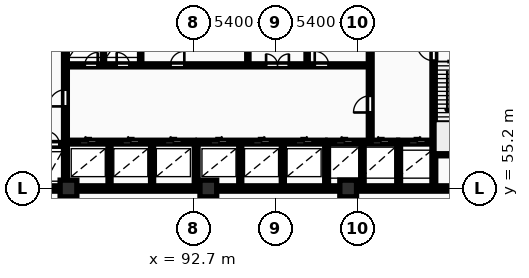
"""IFC4 building model, lengths in metres.
Left out: names, types, materials, properties, quantities, classifications, styles, units other than length and angle.
Written with IfcOpenShell. Run it as: python <this file> out.ifc"""

import sys

from ifc_helpers import new_model, si_unit, direction, frame, frame_2d, origin, origin_2d, place, context, subcontext, project, spatial, rectangle, extrude, element, fill, save


model = new_model("IFC4")
c1 = context("Model", 3, precision=1e-05, world=origin(), true_north=direction((0.0, 1.0)))
c2 = subcontext(c1, "Body", "Model", "MODEL_VIEW")
j1 = project(units=[si_unit("LENGTHUNIT", "METRE"), si_unit("PLANEANGLEUNIT", "RADIAN")], contexts=[c1])
p1 = place(None, origin())
s1 = spatial("IfcSite", under=j1, at=p1, CompositionType="ELEMENT")
p2 = place(p1, origin())
s2 = spatial("IfcBuilding", under=s1, at=p2, CompositionType="ELEMENT")
p3 = place(p2, origin())
s3 = spatial("IfcBuildingStorey", under=s2, at=p3, CompositionType="ELEMENT", Elevation=0.0)
for number, where, z_axis, x_axis in (
    (1, (84.5, 55.2, 0.0), (0.0, 0.0, 1.0), (1.0, 0.0, 0.0)),
    (2, (93.7, 55.2, 0.0), (0.0, 0.0, 1.0), (1.0, 0.0, 0.0)),
    (3, (102.9, 55.2, 0.0), (0.0, 0.0, 1.0), (1.0, 0.0, 0.0)),
):
    element("IfcColumn", number, at=place(p3, frame(where, z_axis=z_axis, x_axis=x_axis)), inside=s3, PredefinedType="COLUMN", context=c2, shape_type="SweptSolid", body=[
        extrude(rectangle(XDim=1.1, YDim=1.1, at=origin_2d()), origin(), (0.0, 0.0, 1.0), 5.4),
    ])
p4 = place(p3, frame((75.95, 55.2, 0.0), z_axis=(0.0, 0.0, 1.0), x_axis=(1.0, 0.0, 0.0)))
e4 = element("IfcWall", 4, at=p4, inside=s3, PredefinedType="SHEAR", context=c2, shape_type="SweptSolid", body=[
    extrude(rectangle(XDim=36.3, YDim=0.35, at=frame_2d((18.15, 0.0))), origin(), (0.0, 0.0, 1.0), 5.4),
])
p5 = place(p3, frame((79.79, 58.1, 0.0), z_axis=(0.0, 0.0, 1.0), x_axis=(1.0, 0.0, 0.0)))
e5 = element("IfcWall", 5, at=p5, inside=s3, PredefinedType="SHEAR", context=c2, shape_type="SweptSolid", body=[
    extrude(rectangle(XDim=4.39, YDim=0.25, at=frame_2d((2.195, 0.0))), origin(), (0.0, 0.0, 1.0), 5.4),
])
p6 = place(p5, frame((1.05, 0.0, 0.0)))
e6 = element("IfcOpeningElement", 6, at=p6, cuts=e5, PredefinedType="OPENING", context=c2, shape_type="SweptSolid", body=[
    extrude(rectangle(XDim=1.12, YDim=2.12, at=frame_2d((0.56, 1.06))), frame((0.0, 0.135, 0.0), z_axis=(0.0, -1.0, 0.0), x_axis=(1.0, 0.0, 0.0)), (0.0, 0.0, 1.0), 0.27),
])
p7 = place(p5, frame((3.26, 0.0, 0.0)))
e7 = element("IfcOpeningElement", 7, at=p7, cuts=e5, PredefinedType="OPENING", context=c2, shape_type="SweptSolid", body=[
    extrude(rectangle(XDim=0.85, YDim=2.05, at=frame_2d((0.425, 1.025))), frame((0.0, 0.135, 0.0), z_axis=(0.0, -1.0, 0.0), x_axis=(1.0, 0.0, 0.0)), (0.0, 0.0, 1.0), 0.27),
])
p8 = place(p3, frame((84.3, 55.4, 0.0), z_axis=(0.0, 0.0, 1.0), x_axis=(0.0, 1.0, 0.0)))
e8 = element("IfcWall", 8, at=p8, inside=s3, PredefinedType="SHEAR", context=c2, shape_type="SweptSolid", body=[
    extrude(rectangle(XDim=11.6, YDim=0.25, at=frame_2d((5.8, 0.0))), origin(), (0.0, 0.0, 1.0), 5.4),
])
p9 = place(p8, frame((5.2, 0.0, 0.0)))
e9 = element("IfcOpeningElement", 9, at=p9, cuts=e8, PredefinedType="OPENING", context=c2, shape_type="SweptSolid", body=[
    extrude(rectangle(XDim=1.1, YDim=2.1, at=frame_2d((0.55, 1.05))), frame((0.0, 0.135, 0.0), z_axis=(0.0, -1.0, 0.0), x_axis=(1.0, 0.0, 0.0)), (0.0, 0.0, 1.0), 0.27),
])
for number, where, z_axis, x_axis in (
    (10, (87.2, 55.4, 0.0), (0.0, 0.0, 1.0), (0.0, 1.0, 0.0)),
    (11, (90.0, 55.4, 0.0), (0.0, 0.0, 1.0), (0.0, 1.0, 0.0)),
):
    element("IfcWall", number, at=place(p3, frame(where, z_axis=z_axis, x_axis=x_axis)), inside=s3, PredefinedType="PARTITIONING", context=c2, shape_type="SweptSolid", body=[
        extrude(rectangle(XDim=2.72, YDim=0.2, at=frame_2d((1.36, 0.0))), origin(), (0.0, 0.0, 1.0), 5.1),
    ])
p10 = place(p3, frame((84.42, 58.25, 0.0), z_axis=(0.0, 0.0, 1.0), x_axis=(1.0, 0.0, 0.0)))
e12 = element("IfcWall", 12, at=p10, inside=s3, PredefinedType="SHEAR", context=c2, shape_type="SweptSolid", body=[
    extrude(rectangle(XDim=8.36, YDim=0.25, at=frame_2d((4.18, 0.0))), origin(), (0.0, 0.0, 1.0), 5.4),
])
p11 = place(p10, frame((0.82, 0.0, 0.0)))
e13 = element("IfcOpeningElement", 13, at=p11, cuts=e12, PredefinedType="OPENING", context=c2, shape_type="SweptSolid", body=[
    extrude(rectangle(XDim=1.12, YDim=2.12, at=frame_2d((0.56, 1.06))), frame((0.0, 0.135, 0.0), z_axis=(0.0, -1.0, 0.0), x_axis=(1.0, 0.0, 0.0)), (0.0, 0.0, 1.0), 0.27),
])
p12 = place(p10, frame((3.62, 0.0, 0.0)))
e14 = element("IfcOpeningElement", 14, at=p12, cuts=e12, PredefinedType="OPENING", context=c2, shape_type="SweptSolid", body=[
    extrude(rectangle(XDim=1.12, YDim=2.12, at=frame_2d((0.56, 1.06))), frame((0.0, 0.135, 0.0), z_axis=(0.0, -1.0, 0.0), x_axis=(1.0, 0.0, 0.0)), (0.0, 0.0, 1.0), 0.27),
])
p13 = place(p10, frame((6.42, 0.0, 0.0)))
e15 = element("IfcOpeningElement", 15, at=p13, cuts=e12, PredefinedType="OPENING", context=c2, shape_type="SweptSolid", body=[
    extrude(rectangle(XDim=1.12, YDim=2.12, at=frame_2d((0.56, 1.06))), frame((0.0, 0.135, 0.0), z_axis=(0.0, -1.0, 0.0), x_axis=(1.0, 0.0, 0.0)), (0.0, 0.0, 1.0), 0.27),
])
p14 = place(p3, frame((92.9, 55.4, 0.0), z_axis=(0.0, 0.0, 1.0), x_axis=(0.0, 1.0, 0.0)))
e16 = element("IfcWall", 16, at=p14, inside=s3, PredefinedType="SHEAR", context=c2, shape_type="SweptSolid", body=[
    extrude(rectangle(XDim=2.85, YDim=0.25, at=frame_2d((1.425, 0.0))), origin(), (0.0, 0.0, 1.0), 5.4),
])
for number, where, z_axis, x_axis in (
    (17, (95.8, 55.4, 0.0), (0.0, 0.0, 1.0), (0.0, 1.0, 0.0)),
    (18, (98.6, 55.4, 0.0), (0.0, 0.0, 1.0), (0.0, 1.0, 0.0)),
):
    element("IfcWall", number, at=place(p3, frame(where, z_axis=z_axis, x_axis=x_axis)), inside=s3, PredefinedType="PARTITIONING", context=c2, shape_type="SweptSolid", body=[
        extrude(rectangle(XDim=2.72, YDim=0.2, at=frame_2d((1.36, 0.0))), origin(), (0.0, 0.0, 1.0), 5.1),
    ])
p15 = place(p3, frame((93.02, 58.25, 0.0), z_axis=(0.0, 0.0, 1.0), x_axis=(1.0, 0.0, 0.0)))
e19 = element("IfcWall", 19, at=p15, inside=s3, PredefinedType="SHEAR", context=c2, shape_type="SweptSolid", body=[
    extrude(rectangle(XDim=8.36, YDim=0.25, at=frame_2d((4.18, 0.0))), origin(), (0.0, 0.0, 1.0), 5.4),
])
p16 = place(p15, frame((0.82, 0.0, 0.0)))
e20 = element("IfcOpeningElement", 20, at=p16, cuts=e19, PredefinedType="OPENING", context=c2, shape_type="SweptSolid", body=[
    extrude(rectangle(XDim=1.12, YDim=2.12, at=frame_2d((0.56, 1.06))), frame((0.0, 0.135, 0.0), z_axis=(0.0, -1.0, 0.0), x_axis=(1.0, 0.0, 0.0)), (0.0, 0.0, 1.0), 0.27),
])
p17 = place(p15, frame((3.62, 0.0, 0.0)))
e21 = element("IfcOpeningElement", 21, at=p17, cuts=e19, PredefinedType="OPENING", context=c2, shape_type="SweptSolid", body=[
    extrude(rectangle(XDim=1.12, YDim=2.12, at=frame_2d((0.56, 1.06))), frame((0.0, 0.135, 0.0), z_axis=(0.0, -1.0, 0.0), x_axis=(1.0, 0.0, 0.0)), (0.0, 0.0, 1.0), 0.27),
])
p18 = place(p15, frame((6.42, 0.0, 0.0)))
e22 = element("IfcOpeningElement", 22, at=p18, cuts=e19, PredefinedType="OPENING", context=c2, shape_type="SweptSolid", body=[
    extrude(rectangle(XDim=1.12, YDim=2.12, at=frame_2d((0.56, 1.06))), frame((0.0, 0.135, 0.0), z_axis=(0.0, -1.0, 0.0), x_axis=(1.0, 0.0, 0.0)), (0.0, 0.0, 1.0), 0.27),
])
p19 = place(p3, frame((101.48, 55.4, 0.0), z_axis=(0.0, 0.0, 1.0), x_axis=(0.0, 1.0, 0.0)))
e23 = element("IfcWall", 23, at=p19, inside=s3, PredefinedType="SHEAR", context=c2, shape_type="SweptSolid", body=[
    extrude(rectangle(XDim=2.85, YDim=0.25, at=frame_2d((1.425, 0.0))), origin(), (0.0, 0.0, 1.0), 5.4),
])
p20 = place(p3, frame((103.85, 55.4, 0.0), z_axis=(0.0, 0.0, 1.0), x_axis=(0.0, 1.0, 0.0)))
e24 = element("IfcWall", 24, at=p20, inside=s3, PredefinedType="PARTITIONING", context=c2, shape_type="SweptSolid", body=[
    extrude(rectangle(XDim=2.72, YDim=0.2, at=frame_2d((1.36, 0.0))), origin(), (0.0, 0.0, 1.0), 5.1),
])
p21 = place(p3, frame((101.55, 58.25, 0.0), z_axis=(0.0, 0.0, 1.0), x_axis=(1.0, 0.0, 0.0)))
e25 = element("IfcWall", 25, at=p21, inside=s3, PredefinedType="SHEAR", context=c2, shape_type="SweptSolid", body=[
    extrude(rectangle(XDim=4.6, YDim=0.25, at=frame_2d((2.3, 0.0))), origin(), (0.0, 0.0, 1.0), 5.4),
])
p22 = place(p21, frame((0.54, 0.0, 0.0)))
e26 = element("IfcOpeningElement", 26, at=p22, cuts=e25, PredefinedType="OPENING", context=c2, shape_type="SweptSolid", body=[
    extrude(rectangle(XDim=1.12, YDim=2.12, at=frame_2d((0.56, 1.06))), frame((0.0, 0.135, 0.0), z_axis=(0.0, -1.0, 0.0), x_axis=(1.0, 0.0, 0.0)), (0.0, 0.0, 1.0), 0.27),
])
p23 = place(p21, frame((2.94, 0.0, 0.0)))
e27 = element("IfcOpeningElement", 27, at=p23, cuts=e25, PredefinedType="OPENING", context=c2, shape_type="SweptSolid", body=[
    extrude(rectangle(XDim=1.12, YDim=2.12, at=frame_2d((0.56, 1.06))), frame((0.0, 0.135, 0.0), z_axis=(0.0, -1.0, 0.0), x_axis=(1.0, 0.0, 0.0)), (0.0, 0.0, 1.0), 0.27),
])
p24 = place(p3, frame((106.22, 55.4, 0.0), z_axis=(0.0, 0.0, 1.0), x_axis=(0.0, 1.0, 0.0)))
e28 = element("IfcWall", 28, at=p24, inside=s3, PredefinedType="SHEAR", context=c2, shape_type="SweptSolid", body=[
    extrude(rectangle(XDim=2.85, YDim=0.25, at=frame_2d((1.425, 0.0))), origin(), (0.0, 0.0, 1.0), 5.4),
])
p25 = place(p3, frame((106.22, 58.25, 0.0), z_axis=(0.0, 0.0, 1.0), x_axis=(1.0, 0.0, 0.0)))
e29 = element("IfcWall", 29, at=p25, inside=s3, PredefinedType="SHEAR", context=c2, shape_type="SweptSolid", body=[
    extrude(rectangle(XDim=2.46, YDim=0.25, at=frame_2d((1.23, 0.0))), origin(), (0.0, 0.0, 1.0), 5.4),
])
p26 = place(p25, frame((0.67, 0.0, 0.0)))
e30 = element("IfcOpeningElement", 30, at=p26, cuts=e29, PredefinedType="OPENING", context=c2, shape_type="SweptSolid", body=[
    extrude(rectangle(XDim=1.12, YDim=2.12, at=frame_2d((0.56, 1.06))), frame((0.0, 0.135, 0.0), z_axis=(0.0, -1.0, 0.0), x_axis=(1.0, 0.0, 0.0)), (0.0, 0.0, 1.0), 0.27),
])
for number, where, z_axis, x_axis in (
    (31, (86.8, 63.4, 0.0), (0.0, 0.0, 1.0), (0.0, 1.0, 0.0)),
    (32, (89.25, 63.4, 0.0), (0.0, 0.0, 1.0), (0.0, 1.0, 0.0)),
    (33, (96.3, 63.4, 0.0), (0.0, 0.0, 1.0), (0.0, 1.0, 0.0)),
    (34, (100.2, 63.4, 0.0), (0.0, 0.0, 1.0), (0.0, 1.0, 0.0)),
):
    element("IfcWall", number, at=place(p3, frame(where, z_axis=z_axis, x_axis=x_axis)), inside=s3, PredefinedType="PARTITIONING", context=c2, shape_type="SweptSolid", body=[
        extrude(rectangle(XDim=3.6, YDim=0.15, at=frame_2d((1.8, 0.0))), origin(), (0.0, 0.0, 1.0), 5.1),
    ])
p27 = place(p3, frame((84.42, 63.3, 0.0), z_axis=(0.0, 0.0, 1.0), x_axis=(1.0, 0.0, 0.0)))
e35 = element("IfcWall", 35, at=p27, inside=s3, PredefinedType="PARTITIONING", context=c2, shape_type="SweptSolid", body=[
    extrude(rectangle(XDim=19.83, YDim=0.2, at=frame_2d((9.915, 0.0))), origin(), (0.0, 0.0, 1.0), 5.1),
])
p28 = place(p27, frame((1.15, 0.0, 0.0)))
e36 = element("IfcOpeningElement", 36, at=p28, cuts=e35, PredefinedType="OPENING", context=c2, shape_type="SweptSolid", body=[
    extrude(rectangle(XDim=0.85, YDim=2.05, at=frame_2d((0.425, 1.025))), frame((0.0, 0.11, 0.0), z_axis=(0.0, -1.0, 0.0), x_axis=(1.0, 0.0, 0.0)), (0.0, 0.0, 1.0), 0.22),
])
p29 = place(p27, frame((3.25, 0.0, 0.0)))
e37 = element("IfcOpeningElement", 37, at=p29, cuts=e35, PredefinedType="OPENING", context=c2, shape_type="SweptSolid", body=[
    extrude(rectangle(XDim=0.85, YDim=2.05, at=frame_2d((0.425, 1.025))), frame((0.0, 0.11, 0.0), z_axis=(0.0, -1.0, 0.0), x_axis=(1.0, 0.0, 0.0)), (0.0, 0.0, 1.0), 0.22),
])
p30 = place(p27, frame((13.08, 0.0, 0.0)))
e38 = element("IfcOpeningElement", 38, at=p30, cuts=e35, PredefinedType="OPENING", context=c2, shape_type="SweptSolid", body=[
    extrude(rectangle(XDim=1.5, YDim=2.2, at=frame_2d((0.75, 1.1))), frame((0.0, 0.11, 0.0), z_axis=(0.0, -1.0, 0.0), x_axis=(1.0, 0.0, 0.0)), (0.0, 0.0, 1.0), 0.22),
])
p31 = place(p27, frame((6.78, 0.0, 0.0)))
e39 = element("IfcOpeningElement", 39, at=p31, cuts=e35, PredefinedType="OPENING", context=c2, shape_type="SweptSolid", body=[
    extrude(rectangle(XDim=0.92, YDim=2.08, at=frame_2d((0.46, 1.04))), frame((0.0, 0.11, 0.0), z_axis=(0.0, -1.0, 0.0), x_axis=(1.0, 0.0, 0.0)), (0.0, 0.0, 1.0), 0.22),
])
p32 = place(p27, frame((16.28, 0.0, 0.0)))
e40 = element("IfcOpeningElement", 40, at=p32, cuts=e35, PredefinedType="OPENING", context=c2, shape_type="SweptSolid", body=[
    extrude(rectangle(XDim=0.92, YDim=2.08, at=frame_2d((0.46, 1.04))), frame((0.0, 0.11, 0.0), z_axis=(0.0, -1.0, 0.0), x_axis=(1.0, 0.0, 0.0)), (0.0, 0.0, 1.0), 0.22),
])
p33 = place(p3, frame((104.35, 58.4, 0.0), z_axis=(0.0, 0.0, 1.0), x_axis=(0.0, 1.0, 0.0)))
e41 = element("IfcWall", 41, at=p33, inside=s3, PredefinedType="SHEAR", context=c2, shape_type="SweptSolid", body=[
    extrude(rectangle(XDim=8.6, YDim=0.25, at=frame_2d((4.3, 0.0))), origin(), (0.0, 0.0, 1.0), 5.4),
])
p34 = place(p33, frame((1.8, 0.0, 0.0)))
e42 = element("IfcOpeningElement", 42, at=p34, cuts=e41, PredefinedType="OPENING", context=c2, shape_type="SweptSolid", body=[
    extrude(rectangle(XDim=1.1, YDim=2.1, at=frame_2d((0.55, 1.05))), frame((0.0, 0.135, 0.0), z_axis=(0.0, -1.0, 0.0), x_axis=(1.0, 0.0, 0.0)), (0.0, 0.0, 1.0), 0.27),
])
p35 = place(p3, frame((108.535, 55.4, 0.0), z_axis=(0.0, 0.0, 1.0), x_axis=(0.0, 1.0, 0.0)))
e43 = element("IfcWall", 43, at=p35, inside=s3, PredefinedType="SHEAR", context=c2, shape_type="SweptSolid", body=[
    extrude(rectangle(XDim=11.6, YDim=0.25, at=frame_2d((5.8, 0.0))), origin(), (0.0, 0.0, 1.0), 5.4),
])
p36 = place(p35, frame((8.2, 0.0, 0.0)))
e44 = element("IfcOpeningElement", 44, at=p36, cuts=e43, PredefinedType="OPENING", context=c2, shape_type="SweptSolid", body=[
    extrude(rectangle(XDim=1.1, YDim=2.1, at=frame_2d((0.55, 1.05))), frame((0.0, 0.135, 0.0), z_axis=(0.0, -1.0, 0.0), x_axis=(1.0, 0.0, 0.0)), (0.0, 0.0, 1.0), 0.27),
])
p37 = place(p35, frame((10.25, 0.0, 0.0)))
e45 = element("IfcOpeningElement", 45, at=p37, cuts=e43, PredefinedType="OPENING", context=c2, shape_type="SweptSolid", body=[
    extrude(rectangle(XDim=0.85, YDim=2.05, at=frame_2d((0.425, 1.025))), frame((0.0, 0.135, 0.0), z_axis=(0.0, -1.0, 0.0), x_axis=(1.0, 0.0, 0.0)), (0.0, 0.0, 1.0), 0.27),
])
p38 = place(p3, frame((108.66, 57.475, 0.0), z_axis=(0.0, 0.0, 1.0), x_axis=(1.0, 0.0, 0.0)))
e46 = element("IfcWall", 46, at=p38, inside=s3, PredefinedType="SHEAR", context=c2, shape_type="SweptSolid", body=[
    extrude(rectangle(XDim=3.24, YDim=0.25, at=frame_2d((1.62, 0.0))), origin(), (0.0, 0.0, 1.0), 5.4),
])
p39 = place(p7, origin())
e47 = element("IfcDoor", 47, at=p39, inside=s3, OperationType="SINGLE_SWING_LEFT", PredefinedType="DOOR", context=c2, shape_type="SweptSolid", body=[
    extrude(rectangle(XDim=0.85, YDim=2.05, at=frame_2d((0.425, 1.025))), frame((0.0, 0.025, 0.0), z_axis=(0.0, -1.0, 0.0), x_axis=(1.0, 0.0, 0.0)), (0.0, 0.0, 1.0), 0.05),
])
fill(e7, e47)
p40 = place(p9, origin())
e48 = element("IfcDoor", 48, at=p40, inside=s3, OperationType="SINGLE_SWING_LEFT", PredefinedType="DOOR", context=c2, shape_type="SweptSolid", body=[
    extrude(rectangle(XDim=1.1, YDim=2.1, at=frame_2d((0.55, 1.05))), frame((0.0, 0.025, 0.0), z_axis=(0.0, -1.0, 0.0), x_axis=(1.0, 0.0, 0.0)), (0.0, 0.0, 1.0), 0.05),
])
fill(e9, e48)
p41 = place(p11, origin())
e49 = element("IfcDoor", 49, at=p41, inside=s3, OperationType="SLIDING_TO_LEFT", PredefinedType="DOOR", context=c2, shape_type="SweptSolid", body=[
    extrude(rectangle(XDim=1.12, YDim=2.12, at=frame_2d((0.56, 1.06))), frame((0.0, 0.025, 0.0), z_axis=(0.0, -1.0, 0.0), x_axis=(1.0, 0.0, 0.0)), (0.0, 0.0, 1.0), 0.05),
])
fill(e13, e49)
p42 = place(p12, origin())
e50 = element("IfcDoor", 50, at=p42, inside=s3, OperationType="SLIDING_TO_LEFT", PredefinedType="DOOR", context=c2, shape_type="SweptSolid", body=[
    extrude(rectangle(XDim=1.12, YDim=2.12, at=frame_2d((0.56, 1.06))), frame((0.0, 0.025, 0.0), z_axis=(0.0, -1.0, 0.0), x_axis=(1.0, 0.0, 0.0)), (0.0, 0.0, 1.0), 0.05),
])
fill(e14, e50)
p43 = place(p13, origin())
e51 = element("IfcDoor", 51, at=p43, inside=s3, OperationType="SLIDING_TO_LEFT", PredefinedType="DOOR", context=c2, shape_type="SweptSolid", body=[
    extrude(rectangle(XDim=1.12, YDim=2.12, at=frame_2d((0.56, 1.06))), frame((0.0, 0.025, 0.0), z_axis=(0.0, -1.0, 0.0), x_axis=(1.0, 0.0, 0.0)), (0.0, 0.0, 1.0), 0.05),
])
fill(e15, e51)
p44 = place(p16, origin())
e52 = element("IfcDoor", 52, at=p44, inside=s3, OperationType="SLIDING_TO_RIGHT", PredefinedType="DOOR", context=c2, shape_type="SweptSolid", body=[
    extrude(rectangle(XDim=1.12, YDim=2.12, at=frame_2d((0.56, 1.06))), frame((0.0, 0.025, 0.0), z_axis=(0.0, -1.0, 0.0), x_axis=(1.0, 0.0, 0.0)), (0.0, 0.0, 1.0), 0.05),
])
fill(e20, e52)
p45 = place(p17, origin())
e53 = element("IfcDoor", 53, at=p45, inside=s3, OperationType="SLIDING_TO_RIGHT", PredefinedType="DOOR", context=c2, shape_type="SweptSolid", body=[
    extrude(rectangle(XDim=1.12, YDim=2.12, at=frame_2d((0.56, 1.06))), frame((0.0, 0.025, 0.0), z_axis=(0.0, -1.0, 0.0), x_axis=(1.0, 0.0, 0.0)), (0.0, 0.0, 1.0), 0.05),
])
fill(e21, e53)
p46 = place(p18, origin())
e54 = element("IfcDoor", 54, at=p46, inside=s3, OperationType="SLIDING_TO_RIGHT", PredefinedType="DOOR", context=c2, shape_type="SweptSolid", body=[
    extrude(rectangle(XDim=1.12, YDim=2.12, at=frame_2d((0.56, 1.06))), frame((0.0, 0.025, 0.0), z_axis=(0.0, -1.0, 0.0), x_axis=(1.0, 0.0, 0.0)), (0.0, 0.0, 1.0), 0.05),
])
fill(e22, e54)
p47 = place(p22, origin())
e55 = element("IfcDoor", 55, at=p47, inside=s3, OperationType="SLIDING_TO_LEFT", PredefinedType="DOOR", context=c2, shape_type="SweptSolid", body=[
    extrude(rectangle(XDim=1.12, YDim=2.12, at=frame_2d((0.56, 1.06))), frame((0.0, 0.025, 0.0), z_axis=(0.0, -1.0, 0.0), x_axis=(1.0, 0.0, 0.0)), (0.0, 0.0, 1.0), 0.05),
])
fill(e26, e55)
p48 = place(p23, origin())
e56 = element("IfcDoor", 56, at=p48, inside=s3, OperationType="SLIDING_TO_LEFT", PredefinedType="DOOR", context=c2, shape_type="SweptSolid", body=[
    extrude(rectangle(XDim=1.12, YDim=2.12, at=frame_2d((0.56, 1.06))), frame((0.0, 0.025, 0.0), z_axis=(0.0, -1.0, 0.0), x_axis=(1.0, 0.0, 0.0)), (0.0, 0.0, 1.0), 0.05),
])
fill(e27, e56)
p49 = place(p26, origin())
e57 = element("IfcDoor", 57, at=p49, inside=s3, OperationType="SLIDING_TO_RIGHT", PredefinedType="DOOR", context=c2, shape_type="SweptSolid", body=[
    extrude(rectangle(XDim=1.12, YDim=2.12, at=frame_2d((0.56, 1.06))), frame((0.0, 0.025, 0.0), z_axis=(0.0, -1.0, 0.0), x_axis=(1.0, 0.0, 0.0)), (0.0, 0.0, 1.0), 0.05),
])
fill(e30, e57)
p50 = place(p28, origin())
e58 = element("IfcDoor", 58, at=p50, inside=s3, OperationType="SINGLE_SWING_RIGHT", PredefinedType="DOOR", context=c2, shape_type="SweptSolid", body=[
    extrude(rectangle(XDim=0.85, YDim=2.05, at=frame_2d((0.425, 1.025))), frame((0.0, 0.025, 0.0), z_axis=(0.0, -1.0, 0.0), x_axis=(1.0, 0.0, 0.0)), (0.0, 0.0, 1.0), 0.05),
])
fill(e36, e58)
p51 = place(p29, origin())
e59 = element("IfcDoor", 59, at=p51, inside=s3, OperationType="SINGLE_SWING_LEFT", PredefinedType="DOOR", context=c2, shape_type="SweptSolid", body=[
    extrude(rectangle(XDim=0.85, YDim=2.05, at=frame_2d((0.425, 1.025))), frame((0.0, 0.025, 0.0), z_axis=(0.0, -1.0, 0.0), x_axis=(1.0, 0.0, 0.0)), (0.0, 0.0, 1.0), 0.05),
])
fill(e37, e59)
p52 = place(p30, origin())
e60 = element("IfcDoor", 60, at=p52, inside=s3, OperationType="DOUBLE_DOOR_SINGLE_SWING", PredefinedType="DOOR", context=c2, shape_type="SweptSolid", body=[
    extrude(rectangle(XDim=1.5, YDim=2.2, at=frame_2d((0.75, 1.1))), frame((0.0, 0.025, 0.0), z_axis=(0.0, -1.0, 0.0), x_axis=(1.0, 0.0, 0.0)), (0.0, 0.0, 1.0), 0.05),
])
fill(e38, e60)
p53 = place(p31, origin())
e61 = element("IfcDoor", 61, at=p53, inside=s3, OperationType="SINGLE_SWING_RIGHT", PredefinedType="DOOR", context=c2, shape_type="SweptSolid", body=[
    extrude(rectangle(XDim=0.92, YDim=2.08, at=frame_2d((0.46, 1.04))), frame((0.0, 0.025, 0.0), z_axis=(0.0, -1.0, 0.0), x_axis=(1.0, 0.0, 0.0)), (0.0, 0.0, 1.0), 0.05),
])
fill(e39, e61)
p54 = place(p32, origin())
e62 = element("IfcDoor", 62, at=p54, inside=s3, OperationType="SINGLE_SWING_LEFT", PredefinedType="DOOR", context=c2, shape_type="SweptSolid", body=[
    extrude(rectangle(XDim=0.92, YDim=2.08, at=frame_2d((0.46, 1.04))), frame((0.0, 0.025, 0.0), z_axis=(0.0, -1.0, 0.0), x_axis=(1.0, 0.0, 0.0)), (0.0, 0.0, 1.0), 0.05),
])
fill(e40, e62)
p55 = place(p34, origin())
e63 = element("IfcDoor", 63, at=p55, inside=s3, OperationType="SINGLE_SWING_LEFT", PredefinedType="DOOR", context=c2, shape_type="SweptSolid", body=[
    extrude(rectangle(XDim=1.1, YDim=2.1, at=frame_2d((0.55, 1.05))), frame((0.0, 0.025, 0.0), z_axis=(0.0, -1.0, 0.0), x_axis=(1.0, 0.0, 0.0)), (0.0, 0.0, 1.0), 0.05),
])
fill(e42, e63)
p56 = place(p36, origin())
e64 = element("IfcDoor", 64, at=p56, inside=s3, OperationType="SINGLE_SWING_RIGHT", PredefinedType="DOOR", context=c2, shape_type="SweptSolid", body=[
    extrude(rectangle(XDim=1.1, YDim=2.1, at=frame_2d((0.55, 1.05))), frame((0.0, 0.025, 0.0), z_axis=(0.0, -1.0, 0.0), x_axis=(1.0, 0.0, 0.0)), (0.0, 0.0, 1.0), 0.05),
])
fill(e44, e64)
save(model, sys.argv[1])
